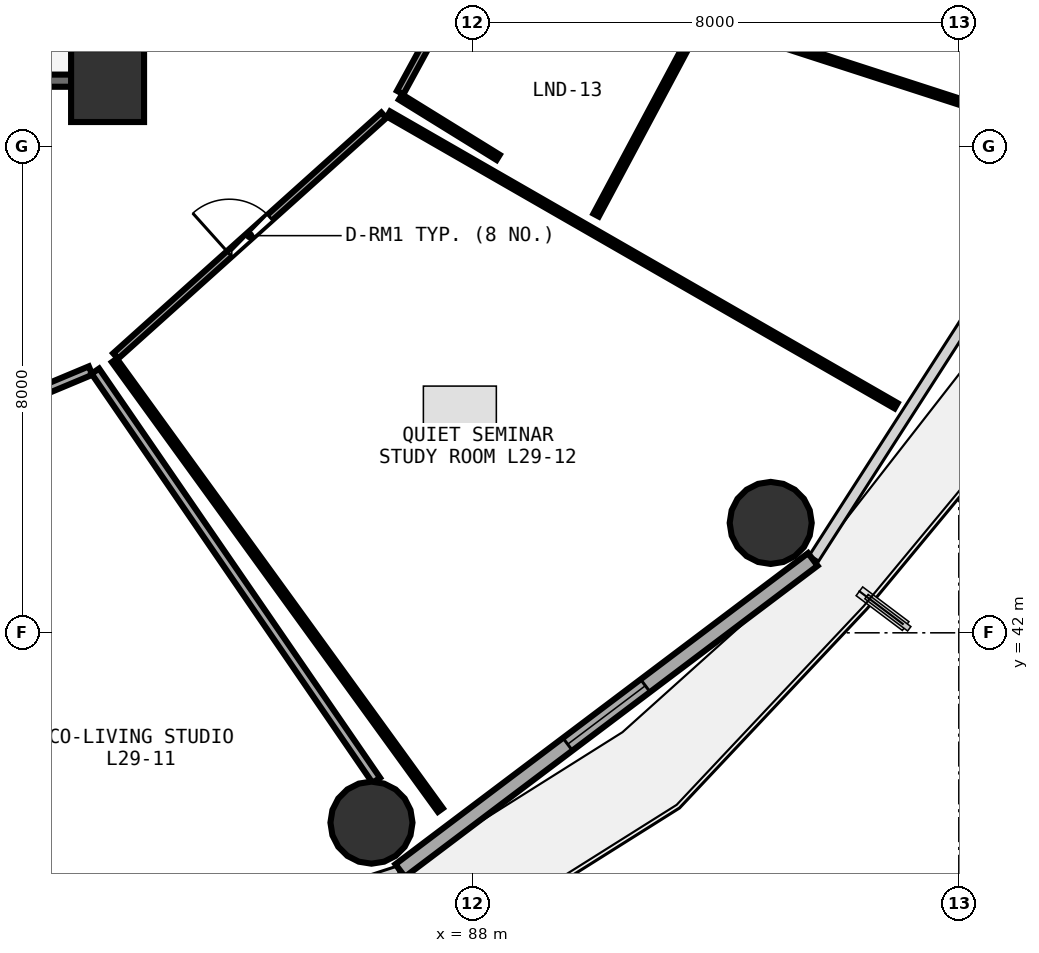
"""IFC4 building model, lengths in metres.
Left out: names, types, materials, properties, quantities, classifications, styles, units other than length and angle.
Written with IfcOpenShell. Run it as: python <this file> out.ifc"""

import sys

from ifc_helpers import new_model, si_unit, direction, frame, frame_2d, origin, origin_2d, place, context, subcontext, project, spatial, rectangle, circle, extrude, element, fill, save


model = new_model("IFC4")
c1 = context("Model", 3, precision=1e-05, world=origin(), true_north=direction((0.0, 1.0)))
c2 = subcontext(c1, "Body", "Model", "MODEL_VIEW")
j1 = project(units=[si_unit("LENGTHUNIT", "METRE"), si_unit("PLANEANGLEUNIT", "RADIAN")], contexts=[c1])
p1 = place(None, origin())
s1 = spatial("IfcSite", under=j1, at=p1, CompositionType="ELEMENT")
p2 = place(p1, origin())
s2 = spatial("IfcBuilding", under=s1, at=p2, CompositionType="ELEMENT")
p3 = place(p2, frame((0.0, 0.0, 113.85)))
s3 = spatial("IfcBuildingStorey", under=s2, at=p3, CompositionType="ELEMENT", Elevation=113.85)
p4 = place(p3, frame((82.0, 51.0, 0.0), z_axis=(0.0, 0.0, 1.0), x_axis=(1.0, 0.0, 0.0)))
e1 = element("IfcColumn", 1, at=p4, inside=s3, PredefinedType="PILASTER", context=c2, shape_type="SweptSolid", body=[
    extrude(rectangle(XDim=1.2, YDim=1.2, at=origin_2d()), origin(), (0.0, 0.0, 1.0), 3.75),
])
for number, where, z_axis, x_axis in (
    (2, (86.34, 38.878, 0.0), (0.0, 0.0, 1.0), (1.0, 0.0, 0.0)),
    (3, (92.906, 43.807, 0.0), (0.0, 0.0, 1.0), (1.0, 0.0, 0.0)),
):
    element("IfcColumn", number, at=place(p3, frame(where, z_axis=z_axis, x_axis=x_axis)), inside=s3, PredefinedType="COLUMN", context=c2, shape_type="SweptSolid", body=[
        extrude(circle(Radius=0.675, at=origin_2d()), origin(), (0.0, 0.0, 1.0), 3.75),
    ])
p5 = place(p3, frame((86.812, 38.09, 0.0), z_axis=(0.0, 0.0, 1.0), x_axis=(0.798501507879, 0.601992808857, 0.0)))
e4 = element("IfcWall", 4, at=p5, inside=s3, PredefinedType="SOLIDWALL", context=c2, shape_type="SweptSolid", body=[
    extrude(rectangle(XDim=8.499, YDim=0.26, at=frame_2d((4.25, 0.0))), origin(), (0.0, 0.0, 1.0), 3.475),
])
p6 = place(p5, frame((3.45, 0.0, 0.85)))
e5 = element("IfcOpeningElement", 5, at=p6, cuts=e4, PredefinedType="OPENING", context=c2, shape_type="SweptSolid", body=[
    extrude(rectangle(XDim=1.6, YDim=1.45, at=frame_2d((0.8, 0.725))), frame((0.0, 0.14, 0.0), z_axis=(0.0, -1.0, 0.0), x_axis=(1.0, 0.0, 0.0)), (0.0, 0.0, 1.0), 0.28),
])
p7 = place(p3, frame((74.0, 51.08, 0.0), z_axis=(0.0, 0.0, 1.0), x_axis=(1.0, 0.0, 0.0)))
e6 = element("IfcWall", 6, at=p7, inside=s3, PredefinedType="SHEAR", context=c2, shape_type="SweptSolid", body=[
    extrude(rectangle(XDim=7.9, YDim=0.2, at=frame_2d((3.95, 0.0))), origin(), (0.0, 0.0, 1.0), 3.49),
])
p8 = place(p7, frame((1.12, 0.0, 0.0)))
e7 = element("IfcOpeningElement", 7, at=p8, cuts=e6, PredefinedType="OPENING", context=c2, shape_type="SweptSolid", body=[
    extrude(rectangle(XDim=1.05, YDim=2.1, at=frame_2d((0.525, 1.05))), frame((0.0, 0.11, 0.0), z_axis=(0.0, -1.0, 0.0), x_axis=(1.0, 0.0, 0.0)), (0.0, 0.0, 1.0), 0.22),
])
p9 = place(p3, frame((82.02, 51.2, 0.0), z_axis=(0.0, 0.0, 1.0), x_axis=(0.0, 1.0, 0.0)))
e8 = element("IfcWall", 8, at=p9, inside=s3, PredefinedType="SHEAR", context=c2, shape_type="SweptSolid", body=[
    extrude(rectangle(XDim=3.07, YDim=0.2, at=frame_2d((1.535, 0.0))), origin(), (0.0, 0.0, 1.0), 3.49),
])
p10 = place(p3, frame((78.797, 45.089, 0.0), z_axis=(0.0, 0.0, 1.0), x_axis=(0.922451198241, 0.386113696809, 0.0)))
e9 = element("IfcWall", 9, at=p10, inside=s3, PredefinedType="PARTITIONING", context=c2, shape_type="SweptSolid", body=[
    extrude(rectangle(XDim=3.169, YDim=0.15, at=frame_2d((1.584, 0.0))), origin(), (0.0, 0.0, 1.0), 2.925),
])
p11 = place(p10, frame((1.11, 0.0, 0.0)))
e10 = element("IfcOpeningElement", 10, at=p11, cuts=e9, PredefinedType="OPENING", context=c2, shape_type="SweptSolid", body=[
    extrude(rectangle(XDim=0.95, YDim=2.08, at=frame_2d((0.475, 1.04))), frame((0.0, 0.085, 0.0), z_axis=(0.0, -1.0, 0.0), x_axis=(1.0, 0.0, 0.0)), (0.0, 0.0, 1.0), 0.17),
])
p12 = place(p3, frame((82.133, 46.552, 0.0), z_axis=(0.0, 0.0, 1.0), x_axis=(0.744127280309, 0.668037866217, 0.0)))
e11 = element("IfcWall", 11, at=p12, inside=s3, PredefinedType="PARTITIONING", context=c2, shape_type="SweptSolid", body=[
    extrude(rectangle(XDim=5.926, YDim=0.12, at=frame_2d((2.963, 0.0))), origin(), (0.0, 0.0, 1.0), 2.925),
])
p13 = place(p12, frame((2.513, 0.0, 0.0)))
e12 = element("IfcOpeningElement", 12, at=p13, cuts=e11, PredefinedType="OPENING", context=c2, shape_type="SweptSolid", body=[
    extrude(rectangle(XDim=0.9, YDim=2.08, at=frame_2d((0.45, 1.04))), frame((0.0, 0.07, 0.0), z_axis=(0.0, -1.0, 0.0), x_axis=(1.0, 0.0, 0.0)), (0.0, 0.0, 1.0), 0.14),
])
p14 = place(p3, frame((86.813, 50.885, 0.0), z_axis=(0.0, 0.0, 1.0), x_axis=(0.478749799851, 0.877951381993, 0.0)))
e13 = element("IfcWall", 13, at=p14, inside=s3, PredefinedType="PARTITIONING", context=c2, shape_type="SweptSolid", body=[
    extrude(rectangle(XDim=2.508, YDim=0.12, at=frame_2d((1.254, 0.0))), origin(), (0.0, 0.0, 1.0), 2.925),
])
p15 = place(p14, frame((0.804, 0.0, 0.0)))
e14 = element("IfcOpeningElement", 14, at=p15, cuts=e13, PredefinedType="OPENING", context=c2, shape_type="SweptSolid", body=[
    extrude(rectangle(XDim=0.9, YDim=2.08, at=frame_2d((0.45, 1.04))), frame((0.0, 0.07, 0.0), z_axis=(0.0, -1.0, 0.0), x_axis=(1.0, 0.0, 0.0)), (0.0, 0.0, 1.0), 0.14),
])
p16 = place(p3, frame((81.799, 46.303, 0.0), z_axis=(0.0, 0.0, 1.0), x_axis=(0.566050189738, -0.824370779866, 0.0)))
e15 = element("IfcWall", 15, at=p16, inside=s3, PredefinedType="PARTITIONING", context=c2, shape_type="SweptSolid", body=[
    extrude(rectangle(XDim=8.163, YDim=0.15, at=frame_2d((4.082, 0.0))), origin(), (0.0, 0.0, 1.0), 2.925),
])
p17 = place(p3, frame((86.622, 50.531, 0.0), z_axis=(0.0, 0.0, 1.0), x_axis=(0.867006010233, -0.498297680328, 0.0)))
e16 = element("IfcWall", 16, at=p17, inside=s3, PredefinedType="PARTITIONING", context=c2, shape_type="SweptSolid", body=[
    extrude(rectangle(XDim=9.627, YDim=0.1, at=frame_2d((4.813, 0.0))), origin(), (0.0, 0.0, 1.0), 2.975),
])
p18 = place(p3, frame((87.473, 39.085, 0.0), z_axis=(0.0, 0.0, 1.0), x_axis=(-0.587049040353, 0.809551372194, 0.0)))
e17 = element("IfcWall", 17, at=p18, inside=s3, PredefinedType="PARTITIONING", context=c2, shape_type="SweptSolid", body=[
    extrude(rectangle(XDim=9.134, YDim=0.1, at=frame_2d((4.567, 0.0))), origin(), (0.0, 0.0, 1.0), 2.925),
])
p19 = place(p3, frame((91.573, 51.749, 0.0), z_axis=(0.0, 0.0, 1.0), x_axis=(-0.471220811646, -0.882015275759, 0.0)))
e18 = element("IfcWall", 18, at=p19, inside=s3, PredefinedType="PARTITIONING", context=c2, shape_type="SweptSolid", body=[
    extrude(rectangle(XDim=3.265, YDim=0.1, at=frame_2d((1.632, 0.0))), origin(), (0.0, 0.0, 1.0), 2.925),
])
p20 = place(p3, frame((88.424, 49.818, 0.0), z_axis=(0.0, 0.0, 1.0), x_axis=(-0.850546182958, 0.525900361908, 0.0)))
e19 = element("IfcWall", 19, at=p20, inside=s3, PredefinedType="PARTITIONING", context=c2, shape_type="SweptSolid", body=[
    extrude(rectangle(XDim=1.888, YDim=0.1, at=frame_2d((0.944, 0.0))), origin(), (0.0, 0.0, 1.0), 2.925),
])
p21 = place(p3, frame((96.503, 50.575, 0.0), z_axis=(0.0, 0.0, 1.0), x_axis=(-0.951344022612, 0.308130736279, 0.0)))
e20 = element("IfcWall", 20, at=p21, inside=s3, PredefinedType="PARTITIONING", context=c2, shape_type="SweptSolid", body=[
    extrude(rectangle(XDim=6.658, YDim=0.1, at=frame_2d((3.329, 0.0))), origin(), (0.0, 0.0, 1.0), 2.925),
])
p22 = place(p6, origin())
e21 = element("IfcWindow", 21, at=p22, inside=s3, PartitioningType="SINGLE_PANEL", PredefinedType="WINDOW", context=c2, shape_type="SweptSolid", body=[
    extrude(rectangle(XDim=1.6, YDim=1.45, at=frame_2d((0.8, 0.725))), frame((0.0, 0.03, 0.0), z_axis=(0.0, -1.0, 0.0), x_axis=(1.0, 0.0, 0.0)), (0.0, 0.0, 1.0), 0.06),
])
fill(e5, e21)
p23 = place(p13, origin())
e22 = element("IfcDoor", 22, at=p23, inside=s3, OperationType="SINGLE_SWING_LEFT", PredefinedType="DOOR", context=c2, shape_type="SweptSolid", body=[
    extrude(rectangle(XDim=0.9, YDim=2.08, at=frame_2d((0.45, 1.04))), frame((0.0, 0.025, 0.0), z_axis=(0.0, -1.0, 0.0), x_axis=(1.0, 0.0, 0.0)), (0.0, 0.0, 1.0), 0.05),
])
fill(e12, e22)
save(model, sys.argv[1])
